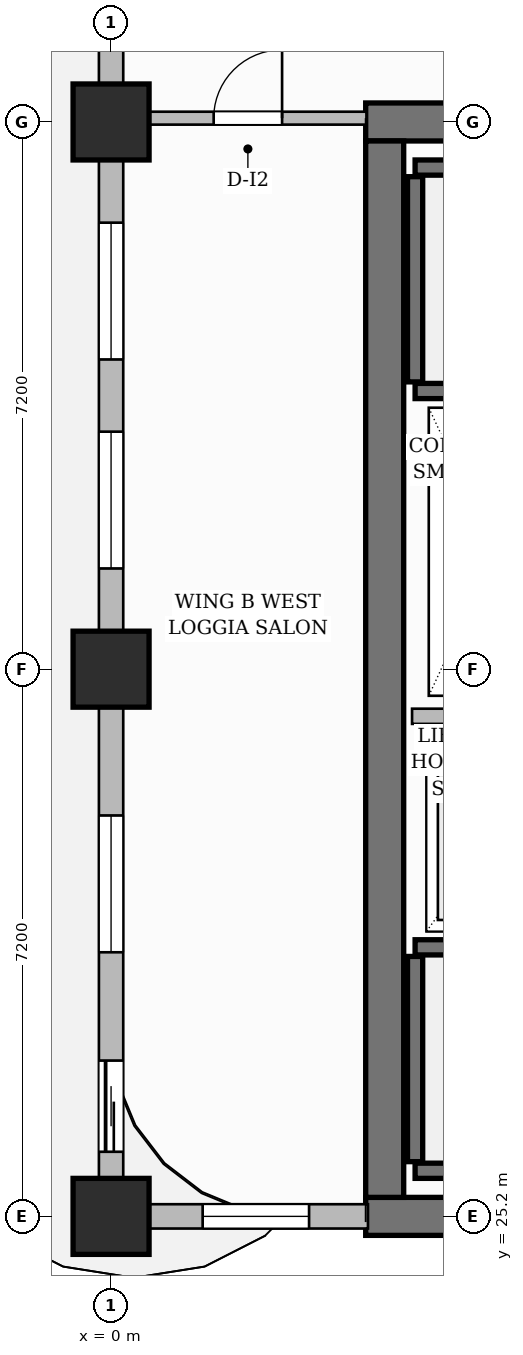
"""IFC4 building model, lengths in metres.
Left out: names, types, materials, properties, quantities, classifications, styles, units other than length and angle.
Written with IfcOpenShell. Run it as: python <this file> out.ifc"""

import sys

from ifc_helpers import new_model, si_unit, direction, frame, frame_2d, origin, origin_2d, place, context, subcontext, project, spatial, rectangle, extrude, source, transform, mapped, element, fill, save


model = new_model("IFC4")
c1 = context("Model", 3, precision=1e-05, world=origin(), true_north=direction((0.0, 1.0)))
c2 = subcontext(c1, "Body", "Model", "MODEL_VIEW")
j1 = project(units=[si_unit("LENGTHUNIT", "METRE"), si_unit("PLANEANGLEUNIT", "RADIAN")], contexts=[c1])
p1 = place(None, origin())
s1 = spatial("IfcSite", under=j1, at=p1, CompositionType="ELEMENT")
p2 = place(p1, origin())
s2 = spatial("IfcBuilding", under=s1, at=p2, CompositionType="ELEMENT")
p3 = place(p2, frame((0.0, 0.0, 184.95)))
s3 = spatial("IfcBuildingStorey", under=s2, at=p3, CompositionType="ELEMENT", Elevation=184.95)
for number, where, z_axis, x_axis in (
    (1, (3.35, 25.2, 0.0), (0.0, 0.0, 1.0), (1.0, 0.0, 0.0)),
    (2, (3.35, 39.6, 0.0), (0.0, 0.0, 1.0), (1.0, 0.0, 0.0)),
):
    element("IfcWall", number, at=place(p3, frame(where, z_axis=z_axis, x_axis=x_axis)), inside=s3, PredefinedType="SHEAR", context=c2, shape_type="SweptSolid", body=[
        extrude(rectangle(XDim=8.3, YDim=0.5, at=frame_2d((4.15, 0.0))), origin(), (0.0, 0.0, 1.0), 3.85),
    ])
p4 = place(p3, frame((3.6, 25.45, 0.0), z_axis=(0.0, 0.0, 1.0), x_axis=(0.0, 1.0, 0.0)))
e3 = element("IfcWall", 3, at=p4, inside=s3, PredefinedType="SHEAR", context=c2, shape_type="SweptSolid", body=[
    extrude(rectangle(XDim=13.9, YDim=0.5, at=frame_2d((6.95, 0.0))), origin(), (0.0, 0.0, 1.0), 3.85),
])
m1 = source(origin(), c2, "Body", "SweptSolid", [
    extrude(rectangle(XDim=1.0, YDim=1.0, at=origin_2d()), origin(), (0.0, 0.0, 1.0), 3.85),
])
for number, where, z_axis, x_axis in (
    (4, (0.0, 25.2, 0.0), (0.0, 0.0, 1.0), (1.0, 0.0, 0.0)),
    (5, (0.0, 32.4, 0.0), (0.0, 0.0, 1.0), (1.0, 0.0, 0.0)),
    (6, (0.0, 39.6, 0.0), (0.0, 0.0, 1.0), (1.0, 0.0, 0.0)),
):
    element("IfcColumn", number, at=place(p3, frame(where, z_axis=z_axis, x_axis=x_axis)), inside=s3, PredefinedType="COLUMN", context=c2, shape_type="MappedRepresentation", body=[
        mapped(m1, transform((0.0, 0.0, 0.0), scale=1.0)),
    ])
p5 = place(p3, frame((4.0, 25.8, 0.0), z_axis=(0.0, 0.0, 1.0), x_axis=(1.0, 0.0, 0.0)))
e7 = element("IfcWall", 7, at=p5, inside=s3, PredefinedType="SHEAR", context=c2, shape_type="SweptSolid", body=[
    extrude(rectangle(XDim=7.1, YDim=0.2, at=frame_2d((3.55, 0.0))), origin(), (0.0, 0.0, 1.0), 3.85),
])
p6 = place(p3, frame((4.0, 25.92, 0.0), z_axis=(0.0, 0.0, 1.0), x_axis=(0.0, 1.0, 0.0)))
e8 = element("IfcWall", 8, at=p6, inside=s3, PredefinedType="SHEAR", context=c2, shape_type="SweptSolid", body=[
    extrude(rectangle(XDim=2.7, YDim=0.2, at=frame_2d((1.35, 0.0))), origin(), (0.0, 0.0, 1.0), 3.85),
])
p7 = place(p3, frame((4.0, 28.74, 0.0), z_axis=(0.0, 0.0, 1.0), x_axis=(1.0, 0.0, 0.0)))
e9 = element("IfcWall", 9, at=p7, inside=s3, PredefinedType="SHEAR", context=c2, shape_type="SweptSolid", body=[
    extrude(rectangle(XDim=7.1, YDim=0.2, at=frame_2d((3.55, 0.0))), origin(), (0.0, 0.0, 1.0), 3.85),
])
p8 = place(p7, frame((5.815, 0.0, 0.0)))
e10 = element("IfcOpeningElement", 10, at=p8, cuts=e9, PredefinedType="OPENING", context=c2, shape_type="SweptSolid", body=[
    extrude(rectangle(XDim=1.05, YDim=2.2, at=frame_2d((0.525, 1.1))), frame((0.0, 0.11, 0.0), z_axis=(0.0, -1.0, 0.0), x_axis=(1.0, 0.0, 0.0)), (0.0, 0.0, 1.0), 0.22),
])
p9 = place(p3, frame((4.0, 39.0, 0.0), z_axis=(0.0, 0.0, 1.0), x_axis=(1.0, 0.0, 0.0)))
e11 = element("IfcWall", 11, at=p9, inside=s3, PredefinedType="SHEAR", context=c2, shape_type="SweptSolid", body=[
    extrude(rectangle(XDim=7.1, YDim=0.2, at=frame_2d((3.55, 0.0))), origin(), (0.0, 0.0, 1.0), 3.85),
])
p10 = place(p3, frame((4.0, 36.18, 0.0), z_axis=(0.0, 0.0, 1.0), x_axis=(0.0, 1.0, 0.0)))
e12 = element("IfcWall", 12, at=p10, inside=s3, PredefinedType="SHEAR", context=c2, shape_type="SweptSolid", body=[
    extrude(rectangle(XDim=2.7, YDim=0.2, at=frame_2d((1.35, 0.0))), origin(), (0.0, 0.0, 1.0), 3.85),
])
p11 = place(p3, frame((4.0, 36.06, 0.0), z_axis=(0.0, 0.0, 1.0), x_axis=(1.0, 0.0, 0.0)))
e13 = element("IfcWall", 13, at=p11, inside=s3, PredefinedType="SHEAR", context=c2, shape_type="SweptSolid", body=[
    extrude(rectangle(XDim=7.1, YDim=0.2, at=frame_2d((3.55, 0.0))), origin(), (0.0, 0.0, 1.0), 3.85),
])
p12 = place(p11, frame((5.815, 0.0, 0.0)))
e14 = element("IfcOpeningElement", 14, at=p12, cuts=e13, PredefinedType="OPENING", context=c2, shape_type="SweptSolid", body=[
    extrude(rectangle(XDim=1.05, YDim=2.2, at=frame_2d((0.525, 1.1))), frame((0.0, 0.11, 0.0), z_axis=(0.0, -1.0, 0.0), x_axis=(1.0, 0.0, 0.0)), (0.0, 0.0, 1.0), 0.22),
])
p13 = place(p3, frame((3.96, 31.78, 0.0), z_axis=(0.0, 0.0, 1.0), x_axis=(1.0, 0.0, 0.0)))
e15 = element("IfcWall", 15, at=p13, inside=s3, PredefinedType="PARTITIONING", context=c2, shape_type="SweptSolid", body=[
    extrude(rectangle(XDim=2.13, YDim=0.2, at=frame_2d((1.065, 0.0))), origin(), (0.0, 0.0, 1.0), 3.6),
])
p14 = place(p3, frame((0.24, 39.65, 0.0), z_axis=(0.0, 0.0, 1.0), x_axis=(1.0, 0.0, 0.0)))
e16 = element("IfcWall", 16, at=p14, inside=s3, PredefinedType="PARTITIONING", context=c2, shape_type="SweptSolid", body=[
    extrude(rectangle(XDim=3.12, YDim=0.17, at=frame_2d((1.56, 0.0))), origin(), (0.0, 0.0, 1.0), 3.6),
])
p15 = place(p14, frame((1.11, 0.0, 0.0)))
e17 = element("IfcOpeningElement", 17, at=p15, cuts=e16, PredefinedType="OPENING", context=c2, shape_type="SweptSolid", body=[
    extrude(rectangle(XDim=0.9, YDim=2.15, at=frame_2d((0.45, 1.075))), frame((0.0, 0.095, 0.0), z_axis=(0.0, -1.0, 0.0), x_axis=(1.0, 0.0, 0.0)), (0.0, 0.0, 1.0), 0.19),
])
p16 = place(p3, frame((0.0, 25.2, 0.0), z_axis=(0.0, 0.0, 1.0), x_axis=(1.0, 0.0, 0.0)))
e18 = element("IfcWall", 18, at=p16, inside=s3, PredefinedType="SOLIDWALL", context=c2, shape_type="SweptSolid", body=[
    extrude(rectangle(XDim=3.38, YDim=0.32, at=frame_2d((1.69, 0.0))), origin(), (0.0, 0.0, 1.0), 3.6),
])
p17 = place(p16, frame((1.205, 0.0, 0.8)))
e19 = element("IfcOpeningElement", 19, at=p17, cuts=e18, PredefinedType="OPENING", context=c2, shape_type="SweptSolid", body=[
    extrude(rectangle(XDim=1.4, YDim=1.85, at=frame_2d((0.7, 0.925))), frame((0.0, 0.17, 0.0), z_axis=(0.0, -1.0, 0.0), x_axis=(1.0, 0.0, 0.0)), (0.0, 0.0, 1.0), 0.34),
])
p18 = place(p3, frame((0.0, 25.25, 0.0), z_axis=(0.0, 0.0, 1.0), x_axis=(0.0, 1.0, 0.0)))
e20 = element("IfcWall", 20, at=p18, inside=s3, PredefinedType="SOLIDWALL", context=c2, shape_type="SweptSolid", body=[
    extrude(rectangle(XDim=21.5, YDim=0.32, at=frame_2d((10.75, 0.0))), origin(), (0.0, 0.0, 1.0), 3.085),
])
p19 = place(p18, frame((18.45, 0.0, 0.0)))
e21 = element("IfcOpeningElement", 21, at=p19, cuts=e20, PredefinedType="OPENING", context=c2, shape_type="SweptSolid", body=[
    extrude(rectangle(XDim=1.2, YDim=2.2, at=frame_2d((0.6, 1.1))), frame((0.0, 0.17, 0.0), z_axis=(0.0, -1.0, 0.0), x_axis=(1.0, 0.0, 0.0)), (0.0, 0.0, 1.0), 0.34),
])
p20 = place(p18, frame((0.8, 0.0, 0.0)))
e22 = element("IfcOpeningElement", 22, at=p20, cuts=e20, PredefinedType="OPENING", context=c2, shape_type="SweptSolid", body=[
    extrude(rectangle(XDim=1.2, YDim=2.2, at=frame_2d((0.6, 1.1))), frame((0.0, 0.17, 0.0), z_axis=(0.0, -1.0, 0.0), x_axis=(1.0, 0.0, 0.0)), (0.0, 0.0, 1.0), 0.34),
])
p21 = place(p18, frame((3.425, 0.0, 0.8)))
e23 = element("IfcOpeningElement", 23, at=p21, cuts=e20, PredefinedType="OPENING", context=c2, shape_type="SweptSolid", body=[
    extrude(rectangle(XDim=1.8, YDim=1.85, at=frame_2d((0.9, 0.925))), frame((0.0, 0.17, 0.0), z_axis=(0.0, -1.0, 0.0), x_axis=(1.0, 0.0, 0.0)), (0.0, 0.0, 1.0), 0.34),
])
p22 = place(p18, frame((8.475, 0.0, 0.8)))
e24 = element("IfcOpeningElement", 24, at=p22, cuts=e20, PredefinedType="OPENING", context=c2, shape_type="SweptSolid", body=[
    extrude(rectangle(XDim=1.8, YDim=1.85, at=frame_2d((0.9, 0.925))), frame((0.0, 0.17, 0.0), z_axis=(0.0, -1.0, 0.0), x_axis=(1.0, 0.0, 0.0)), (0.0, 0.0, 1.0), 0.34),
])
p23 = place(p18, frame((11.225, 0.0, 0.8)))
e25 = element("IfcOpeningElement", 25, at=p23, cuts=e20, PredefinedType="OPENING", context=c2, shape_type="SweptSolid", body=[
    extrude(rectangle(XDim=1.8, YDim=1.85, at=frame_2d((0.9, 0.925))), frame((0.0, 0.17, 0.0), z_axis=(0.0, -1.0, 0.0), x_axis=(1.0, 0.0, 0.0)), (0.0, 0.0, 1.0), 0.34),
])
p24 = place(p18, frame((15.75, 0.0, 0.8)))
e26 = element("IfcOpeningElement", 26, at=p24, cuts=e20, PredefinedType="OPENING", context=c2, shape_type="SweptSolid", body=[
    extrude(rectangle(XDim=1.8, YDim=1.85, at=frame_2d((0.9, 0.925))), frame((0.0, 0.17, 0.0), z_axis=(0.0, -1.0, 0.0), x_axis=(1.0, 0.0, 0.0)), (0.0, 0.0, 1.0), 0.34),
])
m2 = source(origin(), c2, "Body", "SweptSolid", [
    extrude(rectangle(XDim=0.9, YDim=2.15, at=frame_2d((0.45, 1.075))), frame((0.0, 0.025, 0.0), z_axis=(0.0, -1.0, 0.0), x_axis=(1.0, 0.0, 0.0)), (0.0, 0.0, 1.0), 0.05),
])
p25 = place(p15, origin())
e27 = element("IfcDoor", 27, at=p25, inside=s3, OperationType="SINGLE_SWING_RIGHT", PredefinedType="DOOR", context=c2, shape_type="MappedRepresentation", body=[
    mapped(m2, transform((0.0, 0.0, 0.0), scale=1.0)),
])
fill(e17, e27)
m3 = source(origin(), c2, "Body", "SweptSolid", [
    extrude(rectangle(XDim=1.2, YDim=2.2, at=frame_2d((0.6, 1.1))), frame((0.0, 0.025, 0.0), z_axis=(0.0, -1.0, 0.0), x_axis=(1.0, 0.0, 0.0)), (0.0, 0.0, 1.0), 0.05),
])
p26 = place(p20, origin())
e28 = element("IfcDoor", 28, at=p26, inside=s3, OperationType="SLIDING_TO_LEFT", PredefinedType="DOOR", context=c2, shape_type="MappedRepresentation", body=[
    mapped(m3, transform((0.0, 0.0, 0.0), scale=1.0)),
])
fill(e22, e28)
m4 = source(origin(), c2, "Body", "SweptSolid", [
    extrude(rectangle(XDim=1.4, YDim=1.85, at=frame_2d((0.7, 0.925))), frame((0.0, 0.03, 0.0), z_axis=(0.0, -1.0, 0.0), x_axis=(1.0, 0.0, 0.0)), (0.0, 0.0, 1.0), 0.06),
])
p27 = place(p17, origin())
e29 = element("IfcWindow", 29, at=p27, inside=s3, PartitioningType="SINGLE_PANEL", PredefinedType="WINDOW", context=c2, shape_type="MappedRepresentation", body=[
    mapped(m4, transform((0.0, 0.0, 0.0), scale=1.0)),
])
fill(e19, e29)
m5 = source(origin(), c2, "Body", "SweptSolid", [
    extrude(rectangle(XDim=1.8, YDim=1.85, at=frame_2d((0.9, 0.925))), frame((0.0, 0.03, 0.0), z_axis=(0.0, -1.0, 0.0), x_axis=(1.0, 0.0, 0.0)), (0.0, 0.0, 1.0), 0.06),
])
p28 = place(p21, origin())
e30 = element("IfcWindow", 30, at=p28, inside=s3, PartitioningType="DOUBLE_PANEL_VERTICAL", PredefinedType="WINDOW", context=c2, shape_type="MappedRepresentation", body=[
    mapped(m5, transform((0.0, 0.0, 0.0), scale=1.0)),
])
fill(e23, e30)
p29 = place(p22, origin())
e31 = element("IfcWindow", 31, at=p29, inside=s3, PartitioningType="DOUBLE_PANEL_VERTICAL", PredefinedType="WINDOW", context=c2, shape_type="MappedRepresentation", body=[
    mapped(m5, transform((0.0, 0.0, 0.0), scale=1.0)),
])
fill(e24, e31)
p30 = place(p23, origin())
e32 = element("IfcWindow", 32, at=p30, inside=s3, PartitioningType="DOUBLE_PANEL_VERTICAL", PredefinedType="WINDOW", context=c2, shape_type="MappedRepresentation", body=[
    mapped(m5, transform((0.0, 0.0, 0.0), scale=1.0)),
])
fill(e25, e32)
save(model, sys.argv[1])
